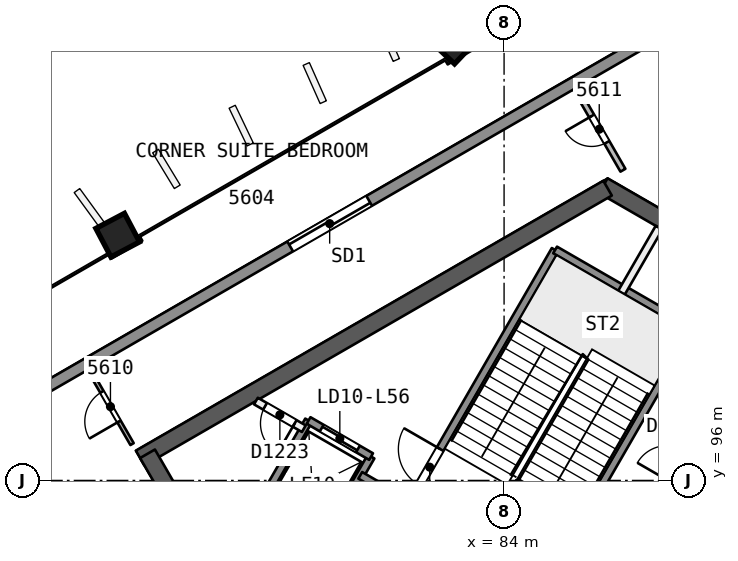
"""IFC4 building model, lengths in metres.
Left out: names, types, materials, properties, quantities, classifications, styles, units other than length and angle.
Written with IfcOpenShell. Run it as: python <this file> out.ifc"""

import sys

from ifc_helpers import new_model, si_unit, direction, frame, frame_2d, origin, origin_2d, place, context, subcontext, project, spatial, rectangle, extrude, element, fill, save


model = new_model("IFC4")
c1 = context("Model", 3, precision=1e-05, world=origin(), true_north=direction((0.0, 1.0)))
c2 = subcontext(c1, "Body", "Model", "MODEL_VIEW")
j1 = project(units=[si_unit("LENGTHUNIT", "METRE"), si_unit("PLANEANGLEUNIT", "RADIAN")], contexts=[c1])
p1 = place(None, origin())
s1 = spatial("IfcSite", under=j1, at=p1, CompositionType="ELEMENT")
p2 = place(p1, origin())
s2 = spatial("IfcBuilding", under=s1, at=p2, CompositionType="ELEMENT")
p3 = place(p2, frame((0.0, 0.0, 228.0)))
s3 = spatial("IfcBuildingStorey", under=s2, at=p3, CompositionType="ELEMENT", Elevation=228.0)
p4 = place(p3, frame((89.655, 101.998, 0.0), z_axis=(0.0, 0.0, 1.0), x_axis=(-0.866042179588, 0.49997094233, 0.0)))
e1 = element("IfcWall", 1, at=p4, inside=s3, PredefinedType="SHEAR", context=c2, shape_type="SweptSolid", body=[
    extrude(rectangle(XDim=3.515, YDim=0.45, at=frame_2d((1.758, 0.0))), origin(), (0.0, 0.0, 1.0), 3.7),
])
p5 = place(p3, frame((86.723, 103.69, 0.0), z_axis=(0.0, 0.0, 1.0), x_axis=(-0.866022713978, -0.500004658852, 0.0)))
e2 = element("IfcWall", 2, at=p5, inside=s3, PredefinedType="SHEAR", context=c2, shape_type="SweptSolid", body=[
    extrude(rectangle(XDim=14.203, YDim=0.45, at=frame_2d((7.102, 0.0))), origin(), (0.0, 0.0, 1.0), 3.7),
])
p6 = place(p3, frame((74.617, 96.701, 0.0), z_axis=(0.0, 0.0, 1.0), x_axis=(0.499994385119, -0.866028645513, 0.0)))
e3 = element("IfcWall", 3, at=p6, inside=s3, PredefinedType="SHEAR", context=c2, shape_type="SweptSolid", body=[
    extrude(rectangle(XDim=10.155, YDim=0.45, at=frame_2d((5.077, 0.0))), origin(), (0.0, 0.0, 1.0), 3.7),
])
p7 = place(p6, frame((8.005, 0.0, 0.0)))
e4 = element("IfcOpeningElement", 4, at=p7, cuts=e3, PredefinedType="OPENING", context=c2, shape_type="SweptSolid", body=[
    extrude(rectangle(XDim=1.2, YDim=2.1, at=frame_2d((0.6, 1.05))), frame((0.0, 0.235, 0.0), z_axis=(0.0, -1.0, 0.0), x_axis=(1.0, 0.0, 0.0)), (0.0, 0.0, 1.0), 0.471),
])
p8 = place(p3, frame((82.69, 107.594, 0.0), z_axis=(-0.008376454378, -0.028163354484, 0.999568237028), x_axis=(0.865846453702, 0.49985452246, 0.021339517038)))
e5 = element("IfcColumn", 5, at=p8, inside=s3, PredefinedType="COLUMN", context=c2, shape_type="SweptSolid", body=[
    extrude(rectangle(XDim=0.85, YDim=0.85, at=origin_2d()), origin(), (0.0, 0.0, 1.0), 3.702),
])
p9 = place(p3, frame((73.832, 102.48, 0.0), z_axis=(0.000857578916, -0.022824792675, 0.999739112668), x_axis=(0.866054521909, 0.499835716509, 0.010668719837)))
e6 = element("IfcColumn", 6, at=p9, inside=s3, PredefinedType="COLUMN", context=c2, shape_type="SweptSolid", body=[
    extrude(rectangle(XDim=0.85, YDim=0.85, at=origin_2d()), origin(), (0.0, 0.0, 1.0), 3.701),
])
p10 = place(p3, frame((74.21, 96.956, 0.0), z_axis=(0.0, 0.0, 1.0), x_axis=(-0.499948534732, 0.866055115232, 0.0)))
e7 = element("IfcWall", 7, at=p10, inside=s3, PredefinedType="PARTITIONING", context=c2, shape_type="SweptSolid", body=[
    extrude(rectangle(XDim=2.275, YDim=0.1, at=frame_2d((1.137, 0.0))), origin(), (0.0, 0.0, 1.0), 3.3),
])
p11 = place(p10, frame((0.687, 0.0, 0.0)))
e8 = element("IfcOpeningElement", 8, at=p11, cuts=e7, PredefinedType="OPENING", context=c2, shape_type="SweptSolid", body=[
    extrude(rectangle(XDim=0.9, YDim=2.1, at=frame_2d((0.45, 1.05))), frame((0.0, 0.061, 0.0), z_axis=(0.0, -1.0, 0.0), x_axis=(1.0, 0.0, 0.0)), (0.0, 0.0, 1.0), 0.121),
])
p12 = place(p3, frame((68.483, 96.276, 0.0), z_axis=(0.0, 0.0, 1.0), x_axis=(0.500011000363, -0.866019052629, 0.0)))
e9 = element("IfcWall", 9, at=p12, inside=s3, PredefinedType="PARTITIONING", context=c2, shape_type="SweptSolid", body=[
    extrude(rectangle(XDim=10.254, YDim=0.2, at=frame_2d((5.127, 0.0))), origin(), (0.0, 0.0, 1.0), 3.3),
])
p13 = place(p3, frame((87.127, 104.162, 0.0), z_axis=(0.0, 0.0, 1.0), x_axis=(-0.500047477074, 0.865997991148, 0.0)))
e10 = element("IfcWall", 10, at=p13, inside=s3, PredefinedType="PARTITIONING", context=c2, shape_type="SweptSolid", body=[
    extrude(rectangle(XDim=2.492, YDim=0.15, at=frame_2d((1.246, 0.0))), origin(), (0.0, 0.0, 1.0), 3.3),
])
p14 = place(p13, frame((0.846, 0.0, 0.0)))
e11 = element("IfcOpeningElement", 11, at=p14, cuts=e10, PredefinedType="OPENING", context=c2, shape_type="SweptSolid", body=[
    extrude(rectangle(XDim=0.8, YDim=2.1, at=frame_2d((0.4, 1.05))), frame((0.0, 0.085, 0.0), z_axis=(0.0, -1.0, 0.0), x_axis=(1.0, 0.0, 0.0)), (0.0, 0.0, 1.0), 0.171),
])
p15 = place(p3, frame((88.043, 107.741, 0.0), z_axis=(0.0, 0.0, 1.0), x_axis=(0.866011086668, -0.500024797153, 0.0)))
e12 = element("IfcWall", 12, at=p15, inside=s3, PredefinedType="SOLIDWALL", context=c2, shape_type="SweptSolid", body=[
    extrude(rectangle(XDim=5.149, YDim=0.3, at=frame_2d((2.575, 0.0))), origin(), (0.0, 0.0, 1.0), 3.3),
])
p16 = place(p3, frame((44.454, 82.574, 0.0), z_axis=(0.0, 0.0, 1.0), x_axis=(0.86602387423, 0.500002649256, 0.0)))
e13 = element("IfcWall", 13, at=p16, inside=s3, PredefinedType="SOLIDWALL", context=c2, shape_type="SweptSolid", body=[
    extrude(rectangle(XDim=50.333, YDim=0.3, at=frame_2d((25.167, 0.0))), origin(), (0.0, 0.0, 1.0), 3.3),
])
p17 = place(p16, frame((24.122, 0.0, 0.0)))
e14 = element("IfcOpeningElement", 14, at=p17, cuts=e13, PredefinedType="OPENING", context=c2, shape_type="SweptSolid", body=[
    extrude(rectangle(XDim=2.4, YDim=2.4, at=frame_2d((1.2, 1.2))), frame((0.0, 0.161, 0.0), z_axis=(0.0, -1.0, 0.0), x_axis=(1.0, 0.0, 0.0)), (0.0, 0.0, 1.0), 0.321),
])
p18 = place(p16, frame((29.111, 0.0, 0.0)))
e15 = element("IfcOpeningElement", 15, at=p18, cuts=e13, PredefinedType="OPENING", context=c2, shape_type="SweptSolid", body=[
    extrude(rectangle(XDim=2.4, YDim=2.4, at=frame_2d((1.2, 1.2))), frame((0.0, 0.161, 0.0), z_axis=(0.0, -1.0, 0.0), x_axis=(1.0, 0.0, 0.0)), (0.0, 0.0, 1.0), 0.321),
])
p19 = place(p16, frame((39.164, 0.0, 0.0)))
e16 = element("IfcOpeningElement", 16, at=p19, cuts=e13, PredefinedType="OPENING", context=c2, shape_type="SweptSolid", body=[
    extrude(rectangle(XDim=2.4, YDim=2.4, at=frame_2d((1.2, 1.2))), frame((0.0, 0.161, 0.0), z_axis=(0.0, -1.0, 0.0), x_axis=(1.0, 0.0, 0.0)), (0.0, 0.0, 1.0), 0.321),
])
p20 = place(p16, frame((18.978, 0.0, 0.0)))
e17 = element("IfcOpeningElement", 17, at=p20, cuts=e13, PredefinedType="OPENING", context=c2, shape_type="SweptSolid", body=[
    extrude(rectangle(XDim=2.4, YDim=2.4, at=frame_2d((1.2, 1.2))), frame((0.0, 0.161, 0.0), z_axis=(0.0, -1.0, 0.0), x_axis=(1.0, 0.0, 0.0)), (0.0, 0.0, 1.0), 0.321),
])
p21 = place(p16, frame((8.763, 0.0, 0.0)))
e18 = element("IfcOpeningElement", 18, at=p21, cuts=e13, PredefinedType="OPENING", context=c2, shape_type="SweptSolid", body=[
    extrude(rectangle(XDim=2.4, YDim=2.4, at=frame_2d((1.2, 1.2))), frame((0.0, 0.161, 0.0), z_axis=(0.0, -1.0, 0.0), x_axis=(1.0, 0.0, 0.0)), (0.0, 0.0, 1.0), 0.321),
])
p22 = place(p3, frame((87.621, 94.86, 0.0), z_axis=(0.0, 0.0, 1.0), x_axis=(0.499993116331, 0.866029378036, 0.0)))
e19 = element("IfcWall", 19, at=p22, inside=s3, PredefinedType="PARTITIONING", context=c2, shape_type="SweptSolid", body=[
    extrude(rectangle(XDim=3.618, YDim=0.15, at=frame_2d((1.809, 0.0))), origin(), (0.0, 0.0, 1.0), 3.3),
])
p23 = place(p22, frame((1.332, 0.0, 0.0)))
e20 = element("IfcOpeningElement", 20, at=p23, cuts=e19, PredefinedType="OPENING", context=c2, shape_type="SweptSolid", body=[
    extrude(rectangle(XDim=0.9, YDim=2.1, at=frame_2d((0.45, 1.05))), frame((0.0, 0.085, 0.0), z_axis=(0.0, -1.0, 0.0), x_axis=(1.0, 0.0, 0.0)), (0.0, 0.0, 1.0), 0.171),
])
p24 = place(p3, frame((85.087, 93.321, 0.0), z_axis=(0.0, 0.0, 1.0), x_axis=(0.500019787375, 0.866013979237, 0.0)))
e21 = element("IfcWall", 21, at=p24, inside=s3, PredefinedType="SOLIDWALL", context=c2, shape_type="SweptSolid", body=[
    extrude(rectangle(XDim=7.7, YDim=0.2, at=frame_2d((3.85, 0.0))), origin(), (0.0, 0.0, 1.0), 3.3),
])
p25 = place(p3, frame((87.09, 100.94, 0.0), z_axis=(0.0, 0.0, 1.0), x_axis=(0.500011643316, 0.866018681408, 0.0)))
e22 = element("IfcWall", 22, at=p25, inside=s3, PredefinedType="PARTITIONING", context=c2, shape_type="SweptSolid", body=[
    extrude(rectangle(XDim=1.973, YDim=0.2, at=frame_2d((0.987, 0.0))), origin(), (0.0, 0.0, 1.0), 3.3),
])
p26 = place(p3, frame((81.493, 95.396, 0.0), z_axis=(0.0, 0.0, 1.0), x_axis=(0.500006057782, 0.866021906294, 0.0)))
e23 = element("IfcWall", 23, at=p26, inside=s3, PredefinedType="SOLIDWALL", context=c2, shape_type="SweptSolid", body=[
    extrude(rectangle(XDim=7.7, YDim=0.2, at=frame_2d((3.85, 0.0))), origin(), (0.0, 0.0, 1.0), 3.3),
])
p27 = place(p26, frame((0.55, 0.0, 0.0)))
e24 = element("IfcOpeningElement", 24, at=p27, cuts=e23, PredefinedType="OPENING", context=c2, shape_type="SweptSolid", body=[
    extrude(rectangle(XDim=1.1, YDim=2.1, at=frame_2d((0.55, 1.05))), frame((0.0, 0.11, 0.0), z_axis=(0.0, -1.0, 0.0), x_axis=(1.0, 0.0, 0.0)), (0.0, 0.0, 1.0), 0.221),
])
for number, where, z_axis, x_axis in (
    (25, (78.976, 93.986, 0.0), (0.0, 0.0, 1.0), (0.5, 0.866, 0.0)),
    (26, (77.33, 94.936, 0.0), (0.0, 0.0, 1.0), (0.5, 0.866, 0.0)),
):
    element("IfcWall", number, at=place(p3, frame(where, z_axis=z_axis, x_axis=x_axis)), inside=s3, PredefinedType="SOLIDWALL", context=c2, shape_type="SweptSolid", body=[
        extrude(rectangle(XDim=3.05, YDim=0.2, at=frame_2d((1.525, 0.0))), origin(), (0.0, 0.0, 1.0), 3.3),
    ])
p28 = place(p3, frame((89.43, 90.814, 0.0), z_axis=(0.0, 0.0, 1.0), x_axis=(-0.866018983788, 0.500011119594, 0.0)))
e27 = element("IfcWall", 27, at=p28, inside=s3, PredefinedType="SOLIDWALL", context=c2, shape_type="SweptSolid", body=[
    extrude(rectangle(XDim=10.64, YDim=0.2, at=frame_2d((5.32, 0.0))), origin(), (0.0, 0.0, 1.0), 3.3),
])
p29 = place(p28, frame((0.37, 0.0, 0.0)))
e28 = element("IfcOpeningElement", 28, at=p29, cuts=e27, PredefinedType="OPENING", context=c2, shape_type="SweptSolid", body=[
    extrude(rectangle(XDim=0.9, YDim=2.1, at=frame_2d((0.45, 1.05))), frame((0.0, 0.11, 0.0), z_axis=(0.0, -1.0, 0.0), x_axis=(1.0, 0.0, 0.0)), (0.0, 0.0, 1.0), 0.221),
])
p30 = place(p3, frame((78.73, 97.361, 0.0), z_axis=(0.0, 0.0, 1.0), x_axis=(-0.866045896294, 0.499964504253, 0.0)))
e29 = element("IfcWall", 29, at=p30, inside=s3, PredefinedType="PARTITIONING", context=c2, shape_type="SweptSolid", body=[
    extrude(rectangle(XDim=1.455, YDim=0.2, at=frame_2d((0.728, 0.0))), origin(), (0.0, 0.0, 1.0), 3.3),
])
p31 = place(p30, frame((0.278, 0.0, 0.0)))
e30 = element("IfcOpeningElement", 30, at=p31, cuts=e29, PredefinedType="OPENING", context=c2, shape_type="SweptSolid", body=[
    extrude(rectangle(XDim=0.9, YDim=2.1, at=frame_2d((0.45, 1.05))), frame((0.0, 0.11, 0.0), z_axis=(0.0, -1.0, 0.0), x_axis=(1.0, 0.0, 0.0)), (0.0, 0.0, 1.0), 0.221),
])
p32 = place(p3, frame((80.5, 96.627, 0.0), z_axis=(0.0, 0.0, 1.0), x_axis=(-0.86601224135, 0.500022797313, 0.0)))
e31 = element("IfcWall", 31, at=p32, inside=s3, PredefinedType="SOLIDWALL", context=c2, shape_type="SweptSolid", body=[
    extrude(rectangle(XDim=1.9, YDim=0.2, at=frame_2d((0.95, 0.0))), origin(), (0.0, 0.0, 1.0), 3.3),
])
p33 = place(p32, frame((0.4, 0.0, 0.0)))
e32 = element("IfcOpeningElement", 32, at=p33, cuts=e31, PredefinedType="OPENING", context=c2, shape_type="SweptSolid", body=[
    extrude(rectangle(XDim=1.1, YDim=2.1, at=frame_2d((0.55, 1.05))), frame((0.0, 0.11, 0.0), z_axis=(0.0, -1.0, 0.0), x_axis=(1.0, 0.0, 0.0)), (0.0, 0.0, 1.0), 0.221),
])
p34 = place(p3, frame((88.937, 99.99, 0.0), z_axis=(0.0, 0.0, 1.0), x_axis=(-0.866004344652, 0.500036473714, 0.0)))
e33 = element("IfcWall", 33, at=p34, inside=s3, PredefinedType="SOLIDWALL", context=c2, shape_type="SweptSolid", body=[
    extrude(rectangle(XDim=4.15, YDim=0.2, at=frame_2d((2.075, 0.0))), origin(), (0.0, 0.0, 1.0), 3.3),
])
p35 = place(p11, origin())
e34 = element("IfcDoor", 34, at=p35, inside=s3, OperationType="SINGLE_SWING_LEFT", PredefinedType="NOTDEFINED", context=c2, shape_type="SweptSolid", body=[
    extrude(rectangle(XDim=0.9, YDim=2.1, at=frame_2d((0.45, 1.05))), frame((0.0, 0.025, 0.0), z_axis=(0.0, -1.0, 0.0), x_axis=(1.0, 0.0, 0.0)), (0.0, 0.0, 1.0), 0.05),
])
fill(e8, e34)
p36 = place(p14, origin())
e35 = element("IfcDoor", 35, at=p36, inside=s3, OperationType="SINGLE_SWING_RIGHT", PredefinedType="NOTDEFINED", context=c2, shape_type="SweptSolid", body=[
    extrude(rectangle(XDim=0.8, YDim=2.1, at=frame_2d((0.4, 1.05))), frame((0.0, 0.025, 0.0), z_axis=(0.0, -1.0, 0.0), x_axis=(1.0, 0.0, 0.0)), (0.0, 0.0, 1.0), 0.05),
])
fill(e11, e35)
p37 = place(p19, origin())
e36 = element("IfcDoor", 36, at=p37, inside=s3, OperationType="SLIDING_TO_LEFT", PredefinedType="NOTDEFINED", context=c2, shape_type="SweptSolid", body=[
    extrude(rectangle(XDim=2.4, YDim=2.4, at=frame_2d((1.2, 1.2))), frame((0.0, 0.025, 0.0), z_axis=(0.0, -1.0, 0.0), x_axis=(1.0, 0.0, 0.0)), (0.0, 0.0, 1.0), 0.05),
])
fill(e16, e36)
p38 = place(p33, origin())
e37 = element("IfcDoor", 37, at=p38, inside=s3, OperationType="SLIDING_TO_RIGHT", PredefinedType="NOTDEFINED", context=c2, shape_type="SweptSolid", body=[
    extrude(rectangle(XDim=1.1, YDim=2.1, at=frame_2d((0.55, 1.05))), frame((0.0, 0.025, 0.0), z_axis=(0.0, -1.0, 0.0), x_axis=(1.0, 0.0, 0.0)), (0.0, 0.0, 1.0), 0.05),
])
fill(e32, e37)
p39 = place(p31, origin())
e38 = element("IfcDoor", 38, at=p39, inside=s3, OperationType="SINGLE_SWING_LEFT", PredefinedType="NOTDEFINED", context=c2, shape_type="SweptSolid", body=[
    extrude(rectangle(XDim=0.9, YDim=2.1, at=frame_2d((0.45, 1.05))), frame((0.0, 0.025, 0.0), z_axis=(0.0, -1.0, 0.0), x_axis=(1.0, 0.0, 0.0)), (0.0, 0.0, 1.0), 0.05),
])
fill(e30, e38)
p40 = place(p27, origin())
e39 = element("IfcDoor", 39, at=p40, inside=s3, OperationType="SINGLE_SWING_RIGHT", PredefinedType="NOTDEFINED", context=c2, shape_type="SweptSolid", body=[
    extrude(rectangle(XDim=1.1, YDim=2.1, at=frame_2d((0.55, 1.05))), frame((0.0, 0.025, 0.0), z_axis=(0.0, -1.0, 0.0), x_axis=(1.0, 0.0, 0.0)), (0.0, 0.0, 1.0), 0.05),
])
fill(e24, e39)
save(model, sys.argv[1])
